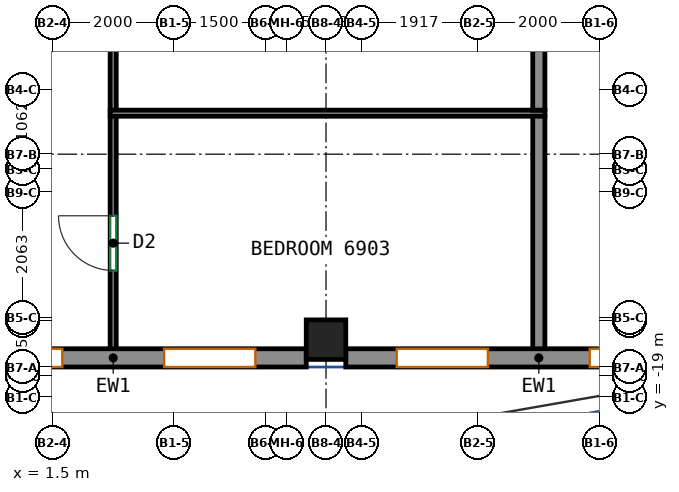
"""IFC4 building model, lengths in metres.
Left out: names, types, materials, properties, quantities, classifications, styles, units other than length and angle.
Written with IfcOpenShell. Run it as: python <this file> out.ifc"""

import sys

from ifc_helpers import new_model, si_unit, direction, frame, frame_2d, origin, origin_2d, place, context, subcontext, project, spatial, rectangle, extrude, source, transform, mapped, element, fill, save


model = new_model("IFC4")
c1 = context("Model", 3, precision=1e-05, world=origin(), true_north=direction((0.0, 1.0)))
c2 = subcontext(c1, "Body", "Model", "MODEL_VIEW")
j1 = project(units=[si_unit("LENGTHUNIT", "METRE"), si_unit("PLANEANGLEUNIT", "RADIAN")], contexts=[c1])
p1 = place(None, origin())
s1 = spatial("IfcSite", under=j1, at=p1, CompositionType="ELEMENT")
p2 = place(p1, origin())
s2 = spatial("IfcBuilding", under=s1, at=p2, CompositionType="ELEMENT")
p3 = place(p2, frame((0.0, 0.0, 280.6)))
s3 = spatial("IfcBuildingStorey", under=s2, at=p3, CompositionType="ELEMENT", Elevation=280.6)
m1 = source(origin(), c2, "Body", "SweptSolid", [
    extrude(rectangle(XDim=0.65, YDim=0.65, at=origin_2d()), origin(), (0.0, 0.0, 1.0), 3.12),
])
p4 = place(p3, frame((6.0, -18.05, 0.0), z_axis=(0.0, 0.0, 1.0), x_axis=(1.0, 0.0, 0.0)))
e1 = element("IfcColumn", 1, at=p4, inside=s3, PredefinedType="COLUMN", context=c2, shape_type="MappedRepresentation", body=[
    mapped(m1, transform((0.0, 0.0, 0.0))),
])
m2 = source(origin(), c2, "Body", "SweptSolid", [
    extrude(rectangle(XDim=6.35, YDim=0.3, at=frame_2d((3.175, 0.0))), origin(), (0.0, 0.0, 1.0), 3.12),
])
p5 = place(p3, frame((-0.675, -18.35, 0.0), z_axis=(0.0, 0.0, 1.0), x_axis=(1.0, 0.0, 0.0)))
e2 = element("IfcWall", 2, at=p5, inside=s3, PredefinedType="SOLIDWALL", context=c2, shape_type="MappedRepresentation", body=[
    mapped(m2, transform((0.0, 0.0, 0.0))),
])
p6 = place(p5, frame((0.837, 0.0, 0.8)))
e3 = element("IfcOpeningElement", 3, at=p6, cuts=e2, PredefinedType="OPENING", context=c2, shape_type="SweptSolid", body=[
    extrude(rectangle(XDim=1.5, YDim=2.05, at=frame_2d((0.75, 1.025))), frame((0.0, 0.16, 0.0), z_axis=(0.0, -1.0, 0.0), x_axis=(1.0, 0.0, 0.0)), (0.0, 0.0, 1.0), 0.32),
])
p7 = place(p5, frame((4.012, 0.0, 0.8)))
e4 = element("IfcOpeningElement", 4, at=p7, cuts=e2, PredefinedType="OPENING", context=c2, shape_type="SweptSolid", body=[
    extrude(rectangle(XDim=1.5, YDim=2.05, at=frame_2d((0.75, 1.025))), frame((0.0, 0.16, 0.0), z_axis=(0.0, -1.0, 0.0), x_axis=(1.0, 0.0, 0.0)), (0.0, 0.0, 1.0), 0.32),
])
p8 = place(p3, frame((6.325, -18.35, 0.0), z_axis=(0.0, 0.0, 1.0), x_axis=(1.0, 0.0, 0.0)))
e5 = element("IfcWall", 5, at=p8, inside=s3, PredefinedType="SOLIDWALL", context=c2, shape_type="MappedRepresentation", body=[
    mapped(m2, transform((0.0, 0.0, 0.0))),
])
p9 = place(p8, frame((0.837, 0.0, 0.8)))
e6 = element("IfcOpeningElement", 6, at=p9, cuts=e5, PredefinedType="OPENING", context=c2, shape_type="SweptSolid", body=[
    extrude(rectangle(XDim=1.5, YDim=2.05, at=frame_2d((0.75, 1.025))), frame((0.0, 0.16, 0.0), z_axis=(0.0, -1.0, 0.0), x_axis=(1.0, 0.0, 0.0)), (0.0, 0.0, 1.0), 0.32),
])
p10 = place(p8, frame((4.012, 0.0, 0.8)))
e7 = element("IfcOpeningElement", 7, at=p10, cuts=e5, PredefinedType="OPENING", context=c2, shape_type="SweptSolid", body=[
    extrude(rectangle(XDim=1.5, YDim=2.05, at=frame_2d((0.75, 1.025))), frame((0.0, 0.16, 0.0), z_axis=(0.0, -1.0, 0.0), x_axis=(1.0, 0.0, 0.0)), (0.0, 0.0, 1.0), 0.32),
])
p11 = place(p3, frame((2.5, -18.25, 0.0), z_axis=(0.0, 0.0, 1.0), x_axis=(0.0, 1.0, 0.0)))
e8 = element("IfcWall", 8, at=p11, inside=s3, PredefinedType="PARTITIONING", context=c2, shape_type="SweptSolid", body=[
    extrude(rectangle(XDim=3.884, YDim=0.1, at=frame_2d((1.942, 0.0))), origin(), (0.0, 0.0, 1.0), 3.12),
])
p12 = place(p11, frame((1.337, 0.0, 0.0)))
e9 = element("IfcOpeningElement", 9, at=p12, cuts=e8, PredefinedType="OPENING", context=c2, shape_type="SweptSolid", body=[
    extrude(rectangle(XDim=0.9, YDim=2.1, at=frame_2d((0.45, 1.05))), frame((0.0, 0.06, 0.0), z_axis=(0.0, -1.0, 0.0), x_axis=(1.0, 0.0, 0.0)), (0.0, 0.0, 1.0), 0.12),
])
p13 = place(p3, frame((2.5, -14.286, 0.0), z_axis=(0.0, 0.0, 1.0), x_axis=(0.0, 1.0, 0.0)))
e10 = element("IfcWall", 10, at=p13, inside=s3, PredefinedType="PARTITIONING", context=c2, shape_type="SweptSolid", body=[
    extrude(rectangle(XDim=3.834, YDim=0.1, at=frame_2d((1.917, 0.0))), origin(), (0.0, 0.0, 1.0), 3.12),
])
p14 = place(p3, frame((9.6, -14.326, 0.0), z_axis=(0.0, 0.0, 1.0), x_axis=(-1.0, 0.0, 0.0)))
e11 = element("IfcWall", 11, at=p14, inside=s3, PredefinedType="PARTITIONING", context=c2, shape_type="SweptSolid", body=[
    extrude(rectangle(XDim=7.15, YDim=0.1, at=frame_2d((3.575, 0.0))), origin(), (0.0, 0.0, 1.0), 3.12),
])
p15 = place(p3, frame((9.5, -18.25, 0.0), z_axis=(0.0, 0.0, 1.0), x_axis=(0.0, 1.0, 0.0)))
e12 = element("IfcWall", 12, at=p15, inside=s3, PredefinedType="PARTITIONING", context=c2, shape_type="SweptSolid", body=[
    extrude(rectangle(XDim=3.874, YDim=0.2, at=frame_2d((1.937, 0.0))), origin(), (0.0, 0.0, 1.0), 3.12),
])
p16 = place(p3, frame((9.5, -14.276, 0.0), z_axis=(0.0, 0.0, 1.0), x_axis=(0.0, 1.0, 0.0)))
e13 = element("IfcWall", 13, at=p16, inside=s3, PredefinedType="PARTITIONING", context=c2, shape_type="SweptSolid", body=[
    extrude(rectangle(XDim=3.824, YDim=0.2, at=frame_2d((1.912, 0.0))), origin(), (0.0, 0.0, 1.0), 3.12),
])
p17 = place(p6, origin())
e14 = element("IfcWindow", 14, at=p17, inside=s3, PartitioningType="SINGLE_PANEL", PredefinedType="WINDOW", context=c2, shape_type="SweptSolid", body=[
    extrude(rectangle(XDim=1.5, YDim=2.05, at=frame_2d((0.75, 1.025))), frame((0.0, 0.03, 0.0), z_axis=(0.0, -1.0, 0.0), x_axis=(1.0, 0.0, 0.0)), (0.0, 0.0, 1.0), 0.06),
])
fill(e3, e14)
p18 = place(p7, origin())
e15 = element("IfcWindow", 15, at=p18, inside=s3, PartitioningType="SINGLE_PANEL", PredefinedType="WINDOW", context=c2, shape_type="SweptSolid", body=[
    extrude(rectangle(XDim=1.5, YDim=2.05, at=frame_2d((0.75, 1.025))), frame((0.0, 0.03, 0.0), z_axis=(0.0, -1.0, 0.0), x_axis=(1.0, 0.0, 0.0)), (0.0, 0.0, 1.0), 0.06),
])
fill(e4, e15)
p19 = place(p9, origin())
e16 = element("IfcWindow", 16, at=p19, inside=s3, PartitioningType="SINGLE_PANEL", PredefinedType="WINDOW", context=c2, shape_type="SweptSolid", body=[
    extrude(rectangle(XDim=1.5, YDim=2.05, at=frame_2d((0.75, 1.025))), frame((0.0, 0.03, 0.0), z_axis=(0.0, -1.0, 0.0), x_axis=(1.0, 0.0, 0.0)), (0.0, 0.0, 1.0), 0.06),
])
fill(e6, e16)
p20 = place(p10, origin())
e17 = element("IfcWindow", 17, at=p20, inside=s3, PartitioningType="SINGLE_PANEL", PredefinedType="WINDOW", context=c2, shape_type="SweptSolid", body=[
    extrude(rectangle(XDim=1.5, YDim=2.05, at=frame_2d((0.75, 1.025))), frame((0.0, 0.03, 0.0), z_axis=(0.0, -1.0, 0.0), x_axis=(1.0, 0.0, 0.0)), (0.0, 0.0, 1.0), 0.06),
])
fill(e7, e17)
p21 = place(p12, origin())
e18 = element("IfcDoor", 18, at=p21, inside=s3, OperationType="SINGLE_SWING_RIGHT", PredefinedType="DOOR", context=c2, shape_type="SweptSolid", body=[
    extrude(rectangle(XDim=0.9, YDim=2.1, at=frame_2d((0.45, 1.05))), frame((0.0, 0.025, 0.0), z_axis=(0.0, -1.0, 0.0), x_axis=(1.0, 0.0, 0.0)), (0.0, 0.0, 1.0), 0.05),
])
fill(e9, e18)
save(model, sys.argv[1])
